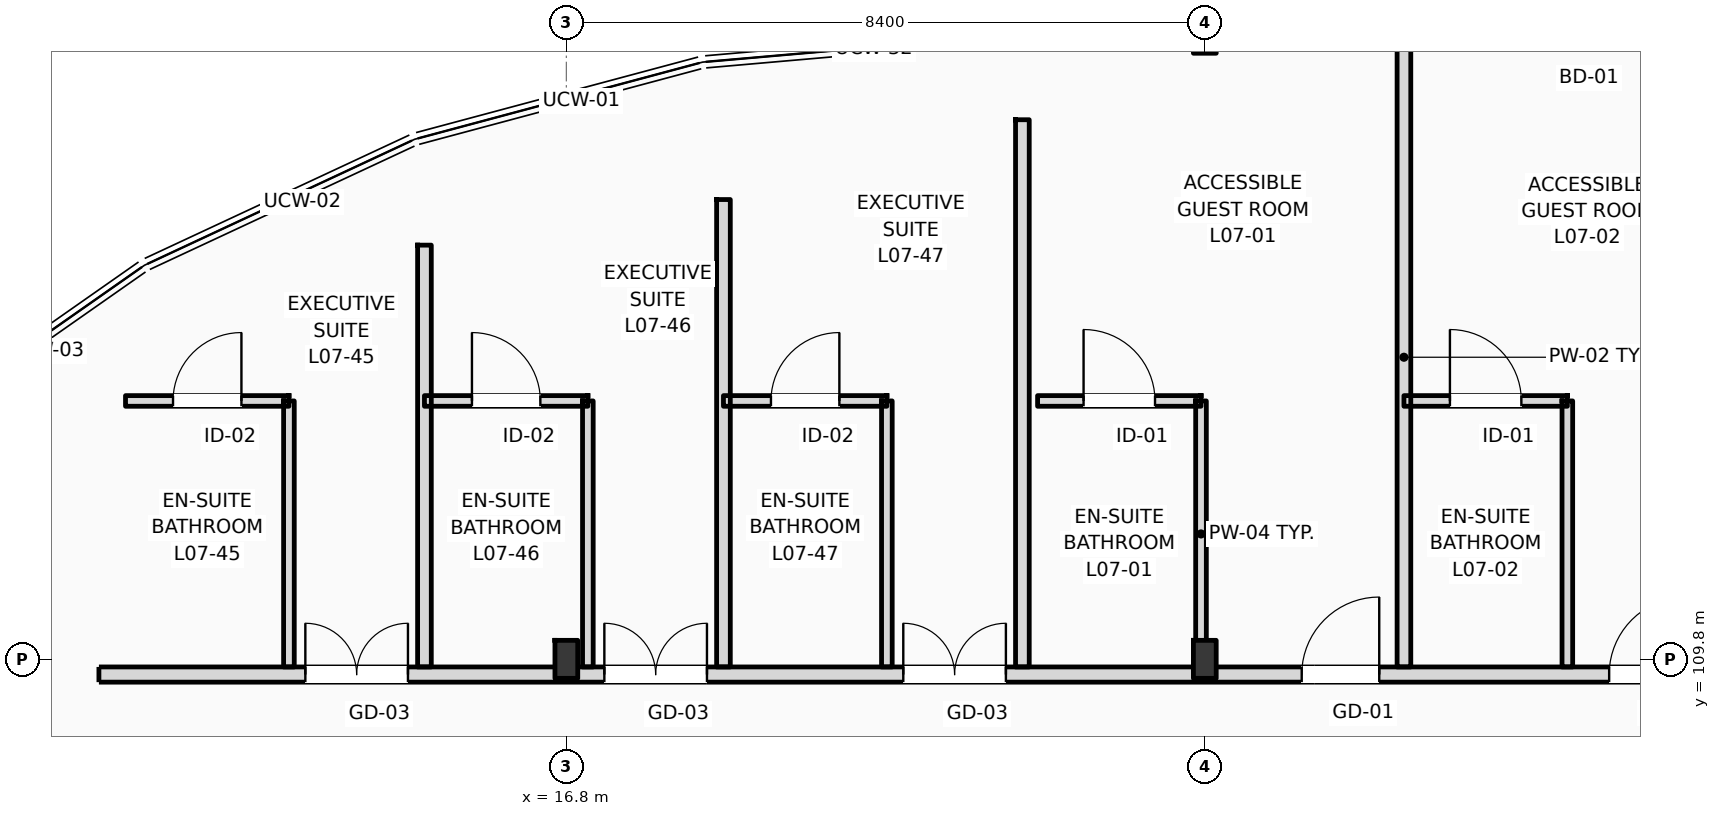
"""IFC4 building model, lengths in metres.
Left out: names, types, materials, properties, quantities, classifications, styles, units other than length and angle.
Written with IfcOpenShell. Run it as: python <this file> out.ifc"""

import sys

from ifc_helpers import new_model, si_unit, direction, frame, frame_2d, origin, origin_2d, place, context, subcontext, project, spatial, rectangle, i_section, extrude, element, fill, save


model = new_model("IFC4")
c1 = context("Model", 3, precision=1e-05, world=origin(), true_north=direction((0.0, 1.0)))
c2 = subcontext(c1, "Body", "Model", "MODEL_VIEW")
j1 = project(units=[si_unit("LENGTHUNIT", "METRE"), si_unit("PLANEANGLEUNIT", "RADIAN")], contexts=[c1])
p1 = place(None, origin())
s1 = spatial("IfcSite", under=j1, at=p1, CompositionType="ELEMENT")
p2 = place(p1, origin())
s2 = spatial("IfcBuilding", under=s1, at=p2, CompositionType="ELEMENT")
p3 = place(p2, frame((0.0, 0.0, 31.8)))
s3 = spatial("IfcBuildingStorey", under=s2, at=p3, CompositionType="ELEMENT", Elevation=31.8)
for number, where, z_axis, x_axis in (
    (1, (16.8, 109.8, 0.0), (0.0, 0.0, 1.0), (1.0, 0.0, 0.0)),
    (2, (25.2, 109.8, 0.0), (0.0, 0.0, 1.0), (1.0, 0.0, 0.0)),
):
    element("IfcColumn", number, at=place(p3, frame(where, z_axis=z_axis, x_axis=x_axis)), inside=s3, PredefinedType="COLUMN", context=c2, shape_type="SweptSolid", body=[
        extrude(i_section(OverallWidth=0.3, OverallDepth=0.5, WebThickness=0.014, FlangeThickness=0.028, FilletRadius=0.027, at=origin_2d()), origin(), (0.0, 0.0, 1.0), 3.6),
    ])
p4 = place(p3, frame((25.2, 118.0, 0.0), z_axis=(0.0, 0.0, 1.0), x_axis=(1.0, 0.0, 0.0)))
e3 = element("IfcColumn", 3, at=p4, inside=s3, PredefinedType="COLUMN", context=c2, shape_type="SweptSolid", body=[
    extrude(i_section(OverallWidth=0.3, OverallDepth=0.45, WebThickness=0.014, FlangeThickness=0.026, FilletRadius=0.027, at=origin_2d()), origin(), (0.0, 0.0, 1.0), 3.6),
])
p5 = place(p3, frame((10.65, 109.6, 0.0), z_axis=(0.0, 0.0, 1.0), x_axis=(1.0, 0.0, 0.0)))
e4 = element("IfcWall", 4, at=p5, inside=s3, PredefinedType="PARTITIONING", context=c2, shape_type="SweptSolid", body=[
    extrude(rectangle(XDim=109.21, YDim=0.2, at=frame_2d((54.605, 0.0))), origin(), (0.0, 0.0, 1.0), 2.72),
])
p6 = place(p5, frame((15.825, 0.0, 0.0)))
e5 = element("IfcOpeningElement", 5, at=p6, cuts=e4, PredefinedType="OPENING", context=c2, shape_type="SweptSolid", body=[
    extrude(rectangle(XDim=1.02, YDim=2.2, at=frame_2d((0.51, 1.1))), frame((0.0, 0.11, 0.0), z_axis=(0.0, -1.0, 0.0), x_axis=(1.0, 0.0, 0.0)), (0.0, 0.0, 1.0), 0.22),
])
p7 = place(p5, frame((19.87, 0.0, 0.0)))
e6 = element("IfcOpeningElement", 6, at=p7, cuts=e4, PredefinedType="OPENING", context=c2, shape_type="SweptSolid", body=[
    extrude(rectangle(XDim=1.02, YDim=2.2, at=frame_2d((0.51, 1.1))), frame((0.0, 0.11, 0.0), z_axis=(0.0, -1.0, 0.0), x_axis=(1.0, 0.0, 0.0)), (0.0, 0.0, 1.0), 0.22),
])
p8 = place(p5, frame((24.47, 0.0, 0.0)))
e7 = element("IfcOpeningElement", 7, at=p8, cuts=e4, PredefinedType="OPENING", context=c2, shape_type="SweptSolid", body=[
    extrude(rectangle(XDim=1.02, YDim=2.2, at=frame_2d((0.51, 1.1))), frame((0.0, 0.11, 0.0), z_axis=(0.0, -1.0, 0.0), x_axis=(1.0, 0.0, 0.0)), (0.0, 0.0, 1.0), 0.22),
])
p9 = place(p5, frame((26.92, 0.0, 0.0)))
e8 = element("IfcOpeningElement", 8, at=p9, cuts=e4, PredefinedType="OPENING", context=c2, shape_type="SweptSolid", body=[
    extrude(rectangle(XDim=1.02, YDim=2.2, at=frame_2d((0.51, 1.1))), frame((0.0, 0.11, 0.0), z_axis=(0.0, -1.0, 0.0), x_axis=(1.0, 0.0, 0.0)), (0.0, 0.0, 1.0), 0.22),
])
p10 = place(p5, frame((33.7, 0.0, 0.0)))
e9 = element("IfcOpeningElement", 9, at=p10, cuts=e4, PredefinedType="OPENING", context=c2, shape_type="SweptSolid", body=[
    extrude(rectangle(XDim=0.96, YDim=2.2, at=frame_2d((0.48, 1.1))), frame((0.0, 0.11, 0.0), z_axis=(0.0, -1.0, 0.0), x_axis=(1.0, 0.0, 0.0)), (0.0, 0.0, 1.0), 0.22),
])
p11 = place(p5, frame((35.9, 0.0, 0.0)))
e10 = element("IfcOpeningElement", 10, at=p11, cuts=e4, PredefinedType="OPENING", context=c2, shape_type="SweptSolid", body=[
    extrude(rectangle(XDim=0.96, YDim=2.2, at=frame_2d((0.48, 1.1))), frame((0.0, 0.11, 0.0), z_axis=(0.0, -1.0, 0.0), x_axis=(1.0, 0.0, 0.0)), (0.0, 0.0, 1.0), 0.22),
])
p12 = place(p5, frame((42.9, 0.0, 0.0)))
e11 = element("IfcOpeningElement", 11, at=p12, cuts=e4, PredefinedType="OPENING", context=c2, shape_type="SweptSolid", body=[
    extrude(rectangle(XDim=0.96, YDim=2.2, at=frame_2d((0.48, 1.1))), frame((0.0, 0.11, 0.0), z_axis=(0.0, -1.0, 0.0), x_axis=(1.0, 0.0, 0.0)), (0.0, 0.0, 1.0), 0.22),
])
p13 = place(p5, frame((47.5, 0.0, 0.0)))
e12 = element("IfcOpeningElement", 12, at=p13, cuts=e4, PredefinedType="OPENING", context=c2, shape_type="SweptSolid", body=[
    extrude(rectangle(XDim=0.96, YDim=2.2, at=frame_2d((0.48, 1.1))), frame((0.0, 0.11, 0.0), z_axis=(0.0, -1.0, 0.0), x_axis=(1.0, 0.0, 0.0)), (0.0, 0.0, 1.0), 0.22),
])
p14 = place(p5, frame((49.95, 0.0, 0.0)))
e13 = element("IfcOpeningElement", 13, at=p14, cuts=e4, PredefinedType="OPENING", context=c2, shape_type="SweptSolid", body=[
    extrude(rectangle(XDim=0.96, YDim=2.2, at=frame_2d((0.48, 1.1))), frame((0.0, 0.11, 0.0), z_axis=(0.0, -1.0, 0.0), x_axis=(1.0, 0.0, 0.0)), (0.0, 0.0, 1.0), 0.22),
])
p15 = place(p5, frame((56.7, 0.0, 0.0)))
e14 = element("IfcOpeningElement", 14, at=p15, cuts=e4, PredefinedType="OPENING", context=c2, shape_type="SweptSolid", body=[
    extrude(rectangle(XDim=0.96, YDim=2.2, at=frame_2d((0.48, 1.1))), frame((0.0, 0.11, 0.0), z_axis=(0.0, -1.0, 0.0), x_axis=(1.0, 0.0, 0.0)), (0.0, 0.0, 1.0), 0.22),
])
p16 = place(p5, frame((59.15, 0.0, 0.0)))
e15 = element("IfcOpeningElement", 15, at=p16, cuts=e4, PredefinedType="OPENING", context=c2, shape_type="SweptSolid", body=[
    extrude(rectangle(XDim=0.96, YDim=2.2, at=frame_2d((0.48, 1.1))), frame((0.0, 0.11, 0.0), z_axis=(0.0, -1.0, 0.0), x_axis=(1.0, 0.0, 0.0)), (0.0, 0.0, 1.0), 0.22),
])
p17 = place(p5, frame((65.9, 0.0, 0.0)))
e16 = element("IfcOpeningElement", 16, at=p17, cuts=e4, PredefinedType="OPENING", context=c2, shape_type="SweptSolid", body=[
    extrude(rectangle(XDim=0.96, YDim=2.2, at=frame_2d((0.48, 1.1))), frame((0.0, 0.11, 0.0), z_axis=(0.0, -1.0, 0.0), x_axis=(1.0, 0.0, 0.0)), (0.0, 0.0, 1.0), 0.22),
])
p18 = place(p5, frame((70.5, 0.0, 0.0)))
e17 = element("IfcOpeningElement", 17, at=p18, cuts=e4, PredefinedType="OPENING", context=c2, shape_type="SweptSolid", body=[
    extrude(rectangle(XDim=0.96, YDim=2.2, at=frame_2d((0.48, 1.1))), frame((0.0, 0.11, 0.0), z_axis=(0.0, -1.0, 0.0), x_axis=(1.0, 0.0, 0.0)), (0.0, 0.0, 1.0), 0.22),
])
p19 = place(p5, frame((72.95, 0.0, 0.0)))
e18 = element("IfcOpeningElement", 18, at=p19, cuts=e4, PredefinedType="OPENING", context=c2, shape_type="SweptSolid", body=[
    extrude(rectangle(XDim=0.96, YDim=2.2, at=frame_2d((0.48, 1.1))), frame((0.0, 0.11, 0.0), z_axis=(0.0, -1.0, 0.0), x_axis=(1.0, 0.0, 0.0)), (0.0, 0.0, 1.0), 0.22),
])
p20 = place(p5, frame((79.7, 0.0, 0.0)))
e19 = element("IfcOpeningElement", 19, at=p20, cuts=e4, PredefinedType="OPENING", context=c2, shape_type="SweptSolid", body=[
    extrude(rectangle(XDim=0.96, YDim=2.2, at=frame_2d((0.48, 1.1))), frame((0.0, 0.11, 0.0), z_axis=(0.0, -1.0, 0.0), x_axis=(1.0, 0.0, 0.0)), (0.0, 0.0, 1.0), 0.22),
])
p21 = place(p5, frame((82.15, 0.0, 0.0)))
e20 = element("IfcOpeningElement", 20, at=p21, cuts=e4, PredefinedType="OPENING", context=c2, shape_type="SweptSolid", body=[
    extrude(rectangle(XDim=0.96, YDim=2.2, at=frame_2d((0.48, 1.1))), frame((0.0, 0.11, 0.0), z_axis=(0.0, -1.0, 0.0), x_axis=(1.0, 0.0, 0.0)), (0.0, 0.0, 1.0), 0.22),
])
p22 = place(p5, frame((88.9, 0.0, 0.0)))
e21 = element("IfcOpeningElement", 21, at=p22, cuts=e4, PredefinedType="OPENING", context=c2, shape_type="SweptSolid", body=[
    extrude(rectangle(XDim=0.96, YDim=2.2, at=frame_2d((0.48, 1.1))), frame((0.0, 0.11, 0.0), z_axis=(0.0, -1.0, 0.0), x_axis=(1.0, 0.0, 0.0)), (0.0, 0.0, 1.0), 0.22),
])
p23 = place(p5, frame((93.75, 0.0, 0.0)))
e22 = element("IfcOpeningElement", 22, at=p23, cuts=e4, PredefinedType="OPENING", context=c2, shape_type="SweptSolid", body=[
    extrude(rectangle(XDim=0.96, YDim=2.2, at=frame_2d((0.48, 1.1))), frame((0.0, 0.11, 0.0), z_axis=(0.0, -1.0, 0.0), x_axis=(1.0, 0.0, 0.0)), (0.0, 0.0, 1.0), 0.22),
])
p24 = place(p5, frame((98.1, 0.0, 0.0)))
e23 = element("IfcOpeningElement", 23, at=p24, cuts=e4, PredefinedType="OPENING", context=c2, shape_type="SweptSolid", body=[
    extrude(rectangle(XDim=0.96, YDim=2.2, at=frame_2d((0.48, 1.1))), frame((0.0, 0.11, 0.0), z_axis=(0.0, -1.0, 0.0), x_axis=(1.0, 0.0, 0.0)), (0.0, 0.0, 1.0), 0.22),
])
p25 = place(p5, frame((102.7, 0.0, 0.0)))
e24 = element("IfcOpeningElement", 24, at=p25, cuts=e4, PredefinedType="OPENING", context=c2, shape_type="SweptSolid", body=[
    extrude(rectangle(XDim=0.96, YDim=2.2, at=frame_2d((0.48, 1.1))), frame((0.0, 0.11, 0.0), z_axis=(0.0, -1.0, 0.0), x_axis=(1.0, 0.0, 0.0)), (0.0, 0.0, 1.0), 0.22),
])
p26 = place(p5, frame((105.04, 0.0, 0.0)))
e25 = element("IfcOpeningElement", 25, at=p26, cuts=e4, PredefinedType="OPENING", context=c2, shape_type="SweptSolid", body=[
    extrude(rectangle(XDim=0.96, YDim=2.2, at=frame_2d((0.48, 1.1))), frame((0.0, 0.11, 0.0), z_axis=(0.0, -1.0, 0.0), x_axis=(1.0, 0.0, 0.0)), (0.0, 0.0, 1.0), 0.22),
])
p27 = place(p5, frame((2.716, 0.0, 0.0)))
e26 = element("IfcOpeningElement", 26, at=p27, cuts=e4, PredefinedType="OPENING", context=c2, shape_type="SweptSolid", body=[
    extrude(rectangle(XDim=1.35, YDim=2.25, at=frame_2d((0.675, 1.125))), frame((0.0, 0.11, 0.0), z_axis=(0.0, -1.0, 0.0), x_axis=(1.0, 0.0, 0.0)), (0.0, 0.0, 1.0), 0.22),
])
p28 = place(p5, frame((6.65, 0.0, 0.0)))
e27 = element("IfcOpeningElement", 27, at=p28, cuts=e4, PredefinedType="OPENING", context=c2, shape_type="SweptSolid", body=[
    extrude(rectangle(XDim=1.35, YDim=2.25, at=frame_2d((0.675, 1.125))), frame((0.0, 0.11, 0.0), z_axis=(0.0, -1.0, 0.0), x_axis=(1.0, 0.0, 0.0)), (0.0, 0.0, 1.0), 0.22),
])
p29 = place(p5, frame((10.583, 0.0, 0.0)))
e28 = element("IfcOpeningElement", 28, at=p29, cuts=e4, PredefinedType="OPENING", context=c2, shape_type="SweptSolid", body=[
    extrude(rectangle(XDim=1.35, YDim=2.25, at=frame_2d((0.675, 1.125))), frame((0.0, 0.11, 0.0), z_axis=(0.0, -1.0, 0.0), x_axis=(1.0, 0.0, 0.0)), (0.0, 0.0, 1.0), 0.22),
])
p30 = place(p3, frame((27.82, 109.7, 0.0), z_axis=(0.0, 0.0, 1.0), x_axis=(0.0, 1.0, 0.0)))
e29 = element("IfcWall", 29, at=p30, inside=s3, PredefinedType="PARTITIONING", context=c2, shape_type="SweptSolid", body=[
    extrude(rectangle(XDim=8.15, YDim=0.18, at=frame_2d((4.075, 0.0))), origin(), (0.0, 0.0, 1.0), 3.05),
])
p31 = place(p3, frame((25.15, 109.7, 0.0), z_axis=(0.0, 0.0, 1.0), x_axis=(0.0, 1.0, 0.0)))
e30 = element("IfcWall", 30, at=p31, inside=s3, PredefinedType="PARTITIONING", context=c2, shape_type="SweptSolid", body=[
    extrude(rectangle(XDim=3.5, YDim=0.14, at=frame_2d((1.75, 0.0))), origin(), (0.0, 0.0, 1.0), 2.99),
])
p32 = place(p3, frame((23.0, 113.2, 0.0), z_axis=(0.0, 0.0, 1.0), x_axis=(1.0, 0.0, 0.0)))
e31 = element("IfcWall", 31, at=p32, inside=s3, PredefinedType="PARTITIONING", context=c2, shape_type="SweptSolid", body=[
    extrude(rectangle(XDim=2.15, YDim=0.14, at=frame_2d((1.075, 0.0))), origin(), (0.0, 0.0, 1.0), 3.36),
])
p33 = place(p32, frame((0.605, 0.0, 0.0)))
e32 = element("IfcOpeningElement", 32, at=p33, cuts=e31, PredefinedType="OPENING", context=c2, shape_type="SweptSolid", body=[
    extrude(rectangle(XDim=0.94, YDim=2.15, at=frame_2d((0.47, 1.075))), frame((0.0, 0.08, 0.0), z_axis=(0.0, -1.0, 0.0), x_axis=(1.0, 0.0, 0.0)), (0.0, 0.0, 1.0), 0.16),
])
p34 = place(p3, frame((29.97, 109.7, 0.0), z_axis=(0.0, 0.0, 1.0), x_axis=(0.0, 1.0, 0.0)))
e33 = element("IfcWall", 33, at=p34, inside=s3, PredefinedType="PARTITIONING", context=c2, shape_type="SweptSolid", body=[
    extrude(rectangle(XDim=3.5, YDim=0.14, at=frame_2d((1.75, 0.0))), origin(), (0.0, 0.0, 1.0), 3.36),
])
p35 = place(p3, frame((27.82, 113.2, 0.0), z_axis=(0.0, 0.0, 1.0), x_axis=(1.0, 0.0, 0.0)))
e34 = element("IfcWall", 34, at=p35, inside=s3, PredefinedType="PARTITIONING", context=c2, shape_type="SweptSolid", body=[
    extrude(rectangle(XDim=2.15, YDim=0.14, at=frame_2d((1.075, 0.0))), origin(), (0.0, 0.0, 1.0), 3.36),
])
p36 = place(p35, frame((0.605, 0.0, 0.0)))
e35 = element("IfcOpeningElement", 35, at=p36, cuts=e34, PredefinedType="OPENING", context=c2, shape_type="SweptSolid", body=[
    extrude(rectangle(XDim=0.94, YDim=2.15, at=frame_2d((0.47, 1.075))), frame((0.0, 0.08, 0.0), z_axis=(0.0, -1.0, 0.0), x_axis=(1.0, 0.0, 0.0)), (0.0, 0.0, 1.0), 0.16),
])
p37 = place(p3, frame((14.933, 109.7, 0.0), z_axis=(0.0, 0.0, 1.0), x_axis=(0.0, 1.0, 0.0)))
e36 = element("IfcWall", 36, at=p37, inside=s3, PredefinedType="PARTITIONING", context=c2, shape_type="SweptSolid", body=[
    extrude(rectangle(XDim=5.55, YDim=0.18, at=frame_2d((2.775, 0.0))), origin(), (0.0, 0.0, 1.0), 3.36),
])
p38 = place(p3, frame((13.15, 109.7, 0.0), z_axis=(0.0, 0.0, 1.0), x_axis=(0.0, 1.0, 0.0)))
e37 = element("IfcWall", 37, at=p38, inside=s3, PredefinedType="PARTITIONING", context=c2, shape_type="SweptSolid", body=[
    extrude(rectangle(XDim=3.5, YDim=0.14, at=frame_2d((1.75, 0.0))), origin(), (0.0, 0.0, 1.0), 3.36),
])
p39 = place(p3, frame((11.0, 113.2, 0.0), z_axis=(0.0, 0.0, 1.0), x_axis=(1.0, 0.0, 0.0)))
e38 = element("IfcWall", 38, at=p39, inside=s3, PredefinedType="PARTITIONING", context=c2, shape_type="SweptSolid", body=[
    extrude(rectangle(XDim=2.15, YDim=0.14, at=frame_2d((1.075, 0.0))), origin(), (0.0, 0.0, 1.0), 3.36),
])
p40 = place(p39, frame((0.625, 0.0, 0.0)))
e39 = element("IfcOpeningElement", 39, at=p40, cuts=e38, PredefinedType="OPENING", context=c2, shape_type="SweptSolid", body=[
    extrude(rectangle(XDim=0.9, YDim=2.1, at=frame_2d((0.45, 1.05))), frame((0.0, 0.08, 0.0), z_axis=(0.0, -1.0, 0.0), x_axis=(1.0, 0.0, 0.0)), (0.0, 0.0, 1.0), 0.16),
])
p41 = place(p3, frame((18.867, 109.7, 0.0), z_axis=(0.0, 0.0, 1.0), x_axis=(0.0, 1.0, 0.0)))
e40 = element("IfcWall", 40, at=p41, inside=s3, PredefinedType="PARTITIONING", context=c2, shape_type="SweptSolid", body=[
    extrude(rectangle(XDim=6.15, YDim=0.18, at=frame_2d((3.075, 0.0))), origin(), (0.0, 0.0, 1.0), 3.36),
])
p42 = place(p3, frame((17.083, 109.7, 0.0), z_axis=(0.0, 0.0, 1.0), x_axis=(0.0, 1.0, 0.0)))
e41 = element("IfcWall", 41, at=p42, inside=s3, PredefinedType="PARTITIONING", context=c2, shape_type="SweptSolid", body=[
    extrude(rectangle(XDim=3.5, YDim=0.14, at=frame_2d((1.75, 0.0))), origin(), (0.0, 0.0, 1.0), 3.36),
])
p43 = place(p3, frame((14.933, 113.2, 0.0), z_axis=(0.0, 0.0, 1.0), x_axis=(1.0, 0.0, 0.0)))
e42 = element("IfcWall", 42, at=p43, inside=s3, PredefinedType="PARTITIONING", context=c2, shape_type="SweptSolid", body=[
    extrude(rectangle(XDim=2.15, YDim=0.14, at=frame_2d((1.075, 0.0))), origin(), (0.0, 0.0, 1.0), 3.36),
])
p44 = place(p43, frame((0.625, 0.0, 0.0)))
e43 = element("IfcOpeningElement", 43, at=p44, cuts=e42, PredefinedType="OPENING", context=c2, shape_type="SweptSolid", body=[
    extrude(rectangle(XDim=0.9, YDim=2.1, at=frame_2d((0.45, 1.05))), frame((0.0, 0.08, 0.0), z_axis=(0.0, -1.0, 0.0), x_axis=(1.0, 0.0, 0.0)), (0.0, 0.0, 1.0), 0.16),
])
p45 = place(p3, frame((22.8, 109.7, 0.0), z_axis=(0.0, 0.0, 1.0), x_axis=(0.0, 1.0, 0.0)))
e44 = element("IfcWall", 44, at=p45, inside=s3, PredefinedType="PARTITIONING", context=c2, shape_type="SweptSolid", body=[
    extrude(rectangle(XDim=7.2, YDim=0.18, at=frame_2d((3.6, 0.0))), origin(), (0.0, 0.0, 1.0), 3.36),
])
p46 = place(p3, frame((21.017, 109.7, 0.0), z_axis=(0.0, 0.0, 1.0), x_axis=(0.0, 1.0, 0.0)))
e45 = element("IfcWall", 45, at=p46, inside=s3, PredefinedType="PARTITIONING", context=c2, shape_type="SweptSolid", body=[
    extrude(rectangle(XDim=3.5, YDim=0.14, at=frame_2d((1.75, 0.0))), origin(), (0.0, 0.0, 1.0), 3.36),
])
p47 = place(p3, frame((18.867, 113.2, 0.0), z_axis=(0.0, 0.0, 1.0), x_axis=(1.0, 0.0, 0.0)))
e46 = element("IfcWall", 46, at=p47, inside=s3, PredefinedType="PARTITIONING", context=c2, shape_type="SweptSolid", body=[
    extrude(rectangle(XDim=2.15, YDim=0.14, at=frame_2d((1.075, 0.0))), origin(), (0.0, 0.0, 1.0), 3.36),
])
p48 = place(p47, frame((0.625, 0.0, 0.0)))
e47 = element("IfcOpeningElement", 47, at=p48, cuts=e46, PredefinedType="OPENING", context=c2, shape_type="SweptSolid", body=[
    extrude(rectangle(XDim=0.9, YDim=2.1, at=frame_2d((0.45, 1.05))), frame((0.0, 0.08, 0.0), z_axis=(0.0, -1.0, 0.0), x_axis=(1.0, 0.0, 0.0)), (0.0, 0.0, 1.0), 0.16),
])
p49 = place(p6, origin())
e48 = element("IfcDoor", 48, at=p49, inside=s3, OperationType="SINGLE_SWING_RIGHT", PredefinedType="DOOR", context=c2, shape_type="SweptSolid", body=[
    extrude(rectangle(XDim=1.02, YDim=2.2, at=frame_2d((0.51, 1.1))), frame((0.0, 0.025, 0.0), z_axis=(0.0, -1.0, 0.0), x_axis=(1.0, 0.0, 0.0)), (0.0, 0.0, 1.0), 0.05),
])
fill(e5, e48)
p50 = place(p33, origin())
e49 = element("IfcDoor", 49, at=p50, inside=s3, OperationType="SINGLE_SWING_LEFT", PredefinedType="DOOR", context=c2, shape_type="SweptSolid", body=[
    extrude(rectangle(XDim=0.94, YDim=2.15, at=frame_2d((0.47, 1.075))), frame((0.0, 0.025, 0.0), z_axis=(0.0, -1.0, 0.0), x_axis=(1.0, 0.0, 0.0)), (0.0, 0.0, 1.0), 0.05),
])
fill(e32, e49)
p51 = place(p7, origin())
e50 = element("IfcDoor", 50, at=p51, inside=s3, OperationType="SINGLE_SWING_RIGHT", PredefinedType="DOOR", context=c2, shape_type="SweptSolid", body=[
    extrude(rectangle(XDim=1.02, YDim=2.2, at=frame_2d((0.51, 1.1))), frame((0.0, 0.025, 0.0), z_axis=(0.0, -1.0, 0.0), x_axis=(1.0, 0.0, 0.0)), (0.0, 0.0, 1.0), 0.05),
])
fill(e6, e50)
p52 = place(p36, origin())
e51 = element("IfcDoor", 51, at=p52, inside=s3, OperationType="SINGLE_SWING_LEFT", PredefinedType="DOOR", context=c2, shape_type="SweptSolid", body=[
    extrude(rectangle(XDim=0.94, YDim=2.15, at=frame_2d((0.47, 1.075))), frame((0.0, 0.025, 0.0), z_axis=(0.0, -1.0, 0.0), x_axis=(1.0, 0.0, 0.0)), (0.0, 0.0, 1.0), 0.05),
])
fill(e35, e51)
p53 = place(p27, origin())
e52 = element("IfcDoor", 52, at=p53, inside=s3, OperationType="DOUBLE_SWING_LEFT", PredefinedType="DOOR", context=c2, shape_type="SweptSolid", body=[
    extrude(rectangle(XDim=1.35, YDim=2.25, at=frame_2d((0.675, 1.125))), frame((0.0, 0.025, 0.0), z_axis=(0.0, -1.0, 0.0), x_axis=(1.0, 0.0, 0.0)), (0.0, 0.0, 1.0), 0.05),
])
fill(e26, e52)
p54 = place(p40, origin())
e53 = element("IfcDoor", 53, at=p54, inside=s3, OperationType="SINGLE_SWING_RIGHT", PredefinedType="DOOR", context=c2, shape_type="SweptSolid", body=[
    extrude(rectangle(XDim=0.9, YDim=2.1, at=frame_2d((0.45, 1.05))), frame((0.0, 0.025, 0.0), z_axis=(0.0, -1.0, 0.0), x_axis=(1.0, 0.0, 0.0)), (0.0, 0.0, 1.0), 0.05),
])
fill(e39, e53)
p55 = place(p28, origin())
e54 = element("IfcDoor", 54, at=p55, inside=s3, OperationType="DOUBLE_SWING_LEFT", PredefinedType="DOOR", context=c2, shape_type="SweptSolid", body=[
    extrude(rectangle(XDim=1.35, YDim=2.25, at=frame_2d((0.675, 1.125))), frame((0.0, 0.025, 0.0), z_axis=(0.0, -1.0, 0.0), x_axis=(1.0, 0.0, 0.0)), (0.0, 0.0, 1.0), 0.05),
])
fill(e27, e54)
p56 = place(p44, origin())
e55 = element("IfcDoor", 55, at=p56, inside=s3, OperationType="SINGLE_SWING_LEFT", PredefinedType="DOOR", context=c2, shape_type="SweptSolid", body=[
    extrude(rectangle(XDim=0.9, YDim=2.1, at=frame_2d((0.45, 1.05))), frame((0.0, 0.025, 0.0), z_axis=(0.0, -1.0, 0.0), x_axis=(1.0, 0.0, 0.0)), (0.0, 0.0, 1.0), 0.05),
])
fill(e43, e55)
p57 = place(p29, origin())
e56 = element("IfcDoor", 56, at=p57, inside=s3, OperationType="DOUBLE_SWING_LEFT", PredefinedType="DOOR", context=c2, shape_type="SweptSolid", body=[
    extrude(rectangle(XDim=1.35, YDim=2.25, at=frame_2d((0.675, 1.125))), frame((0.0, 0.025, 0.0), z_axis=(0.0, -1.0, 0.0), x_axis=(1.0, 0.0, 0.0)), (0.0, 0.0, 1.0), 0.05),
])
fill(e28, e56)
p58 = place(p48, origin())
e57 = element("IfcDoor", 57, at=p58, inside=s3, OperationType="SINGLE_SWING_RIGHT", PredefinedType="DOOR", context=c2, shape_type="SweptSolid", body=[
    extrude(rectangle(XDim=0.9, YDim=2.1, at=frame_2d((0.45, 1.05))), frame((0.0, 0.025, 0.0), z_axis=(0.0, -1.0, 0.0), x_axis=(1.0, 0.0, 0.0)), (0.0, 0.0, 1.0), 0.05),
])
fill(e47, e57)
save(model, sys.argv[1])
